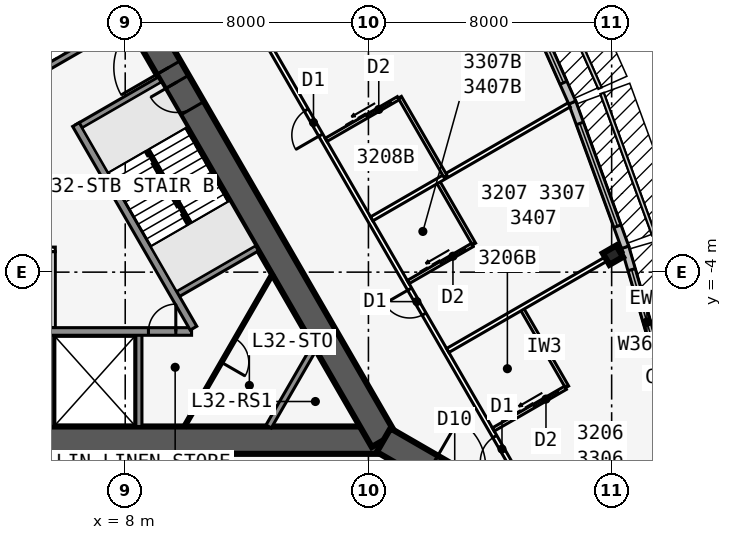
"""IFC4 building model, lengths in metres.
Left out: names, types, materials, properties, quantities, classifications, styles, units other than length and angle.
Written with IfcOpenShell. Run it as: python <this file> out.ifc"""

import sys

from ifc_helpers import new_model, si_unit, direction, frame, frame_2d, origin, origin_2d, place, context, subcontext, project, spatial, rectangle, i_section, extrude, element, fill, save


model = new_model("IFC4")
c1 = context("Model", 3, precision=1e-05, world=origin(), true_north=direction((0.0, 1.0)))
c2 = subcontext(c1, "Body", "Model", "MODEL_VIEW")
j1 = project(units=[si_unit("LENGTHUNIT", "METRE"), si_unit("PLANEANGLEUNIT", "RADIAN")], contexts=[c1])
p1 = place(None, origin())
s1 = spatial("IfcSite", under=j1, at=p1, CompositionType="ELEMENT")
p2 = place(p1, origin())
s2 = spatial("IfcBuilding", under=s1, at=p2, CompositionType="ELEMENT")
p3 = place(p2, frame((0.0, 0.0, 124.9)))
s3 = spatial("IfcBuildingStorey", under=s2, at=p3, CompositionType="ELEMENT", Elevation=124.9)
p4 = place(p3, frame((-16.5, -9.526, 0.0), z_axis=(0.0, 0.0, 1.0), x_axis=(1.0, 0.0, 0.0)))
e1 = element("IfcWall", 1, at=p4, inside=s3, PredefinedType="SHEAR", context=c2, shape_type="SweptSolid", body=[
    extrude(rectangle(XDim=33.0, YDim=0.9, at=frame_2d((16.5, 0.0))), origin(), (0.0, 0.0, 1.0), 3.4),
])
p5 = place(p4, frame((14.05, 0.0, 0.0)))
e2 = element("IfcOpeningElement", 2, at=p5, cuts=e1, PredefinedType="OPENING", context=c2, shape_type="SweptSolid", body=[
    extrude(rectangle(XDim=1.8, YDim=2.13, at=frame_2d((0.9, 1.065))), frame((0.0, 0.46, 0.0), z_axis=(0.0, -1.0, 0.0), x_axis=(1.0, 0.0, 0.0)), (0.0, 0.0, 1.0), 0.92),
])
p6 = place(p3, frame((-0.55, -5.951, 0.0), z_axis=(0.0, 0.0, 1.0), x_axis=(1.0, 0.0, 0.0)))
e3 = element("IfcWall", 3, at=p6, inside=s3, PredefinedType="SOLIDWALL", context=c2, shape_type="SweptSolid", body=[
    extrude(rectangle(XDim=10.733, YDim=0.25, at=frame_2d((5.366, 0.0))), origin(), (0.0, 0.0, 1.0), 3.235),
])
p7 = place(p6, frame((9.314, 0.0, 0.0)))
e4 = element("IfcOpeningElement", 4, at=p7, cuts=e3, PredefinedType="OPENING", context=c2, shape_type="SweptSolid", body=[
    extrude(rectangle(XDim=0.9, YDim=2.13, at=frame_2d((0.45, 1.065))), frame((0.0, 0.135, 0.0), z_axis=(0.0, -1.0, 0.0), x_axis=(1.0, 0.0, 0.0)), (0.0, 0.0, 1.0), 0.27),
])
p8 = place(p6, frame((1.05, 0.0, 0.0)))
e5 = element("IfcOpeningElement", 5, at=p8, cuts=e3, PredefinedType="OPENING", context=c2, shape_type="SweptSolid", body=[
    extrude(rectangle(XDim=1.1, YDim=2.13, at=frame_2d((0.55, 1.065))), frame((0.0, 0.135, 0.0), z_axis=(0.0, -1.0, 0.0), x_axis=(1.0, 0.0, 0.0)), (0.0, 0.0, 1.0), 0.27),
])
p9 = place(p6, frame((4.05, 0.0, 0.0)))
e6 = element("IfcOpeningElement", 6, at=p9, cuts=e3, PredefinedType="OPENING", context=c2, shape_type="SweptSolid", body=[
    extrude(rectangle(XDim=1.1, YDim=2.13, at=frame_2d((0.55, 1.065))), frame((0.0, 0.135, 0.0), z_axis=(0.0, -1.0, 0.0), x_axis=(1.0, 0.0, 0.0)), (0.0, 0.0, 1.0), 0.27),
])
for number, where, z_axis, x_axis in (
    (7, (5.55, -5.951, 0.0), (0.0, 0.0, 1.0), (0.0, -1.0, 0.0)),
    (8, (8.45, -5.951, 0.0), (0.0, 0.0, 1.0), (0.0, -1.0, 0.0)),
):
    element("IfcWall", number, at=place(p3, frame(where, z_axis=z_axis, x_axis=x_axis)), inside=s3, PredefinedType="SOLIDWALL", context=c2, shape_type="SweptSolid", body=[
        extrude(rectangle(XDim=3.125, YDim=0.2, at=frame_2d((1.562, 0.0))), origin(), (0.0, 0.0, 1.0), 3.235),
    ])
p10 = place(p3, frame((16.5, -9.526, 0.0), z_axis=(0.0, 0.0, 1.0), x_axis=(-0.499999749417, 0.866025548458, 0.0)))
e9 = element("IfcWall", 9, at=p10, inside=s3, PredefinedType="SHEAR", context=c2, shape_type="SweptSolid", body=[
    extrude(rectangle(XDim=33.0, YDim=0.9, at=frame_2d((16.5, 0.0))), origin(), (0.0, 0.0, 1.0), 3.4),
])
p11 = place(p10, frame((14.15, 0.0, 0.0)))
e10 = element("IfcOpeningElement", 10, at=p11, cuts=e9, PredefinedType="OPENING", context=c2, shape_type="SweptSolid", body=[
    extrude(rectangle(XDim=1.8, YDim=2.13, at=frame_2d((0.9, 1.065))), frame((0.0, 0.46, 0.0), z_axis=(0.0, -1.0, 0.0), x_axis=(1.0, 0.0, 0.0)), (0.0, 0.0, 1.0), 0.92),
])
p12 = place(p10, frame((12.6, 0.0, 0.0)))
e11 = element("IfcOpeningElement", 11, at=p12, cuts=e9, PredefinedType="OPENING", context=c2, shape_type="SweptSolid", body=[
    extrude(rectangle(XDim=1.0, YDim=2.13, at=frame_2d((0.5, 1.065))), frame((0.0, 0.46, 0.0), z_axis=(0.0, -1.0, 0.0), x_axis=(1.0, 0.0, 0.0)), (0.0, 0.0, 1.0), 0.92),
])
p13 = place(p3, frame((10.245, -5.843, 0.0), z_axis=(0.0, 0.0, 1.0), x_axis=(-0.499993009313, 0.866029439822, 0.0)))
e12 = element("IfcWall", 12, at=p13, inside=s3, PredefinedType="SOLIDWALL", context=c2, shape_type="SweptSolid", body=[
    extrude(rectangle(XDim=7.733, YDim=0.25, at=frame_2d((3.866, 0.0))), origin(), (0.0, 0.0, 1.0), 3.235),
])
for number, where, z_axis, x_axis in (
    (13, (9.629, -4.775, 0.0), (0.0, 0.0, 1.0), (0.866, 0.5, 0.0)),
    (14, (6.429, 0.767, 0.0), (0.0, 0.0, 1.0), (0.866, 0.5, 0.0)),
    (15, (5.329, 2.673, 0.0), (0.0, 0.0, 1.0), (0.866, 0.5, 0.0)),
):
    element("IfcWall", number, at=place(p3, frame(where, z_axis=z_axis, x_axis=x_axis)), inside=s3, PredefinedType="SOLIDWALL", context=c2, shape_type="SweptSolid", body=[
        extrude(rectangle(XDim=3.125, YDim=0.2, at=frame_2d((1.562, 0.0))), origin(), (0.0, 0.0, 1.0), 3.235),
    ])
p14 = place(p3, frame((16.5, -9.526, 0.0), z_axis=(0.0, 0.0, 1.0), x_axis=(0.866031398331, -0.499989616998, 0.0)))
e16 = element("IfcWall", 16, at=p14, inside=s3, PredefinedType="SHEAR", context=c2, shape_type="SweptSolid", body=[
    extrude(rectangle(XDim=4.746, YDim=0.9, at=frame_2d((2.373, 0.0))), origin(), (0.0, 0.0, 1.0), 3.4),
])
p15 = place(p14, frame((1.8, 0.0, 0.0)))
e17 = element("IfcOpeningElement", 17, at=p15, cuts=e16, PredefinedType="OPENING", context=c2, shape_type="SweptSolid", body=[
    extrude(rectangle(XDim=1.8, YDim=2.13, at=frame_2d((0.9, 1.065))), frame((0.0, 0.46, 0.0), z_axis=(0.0, -1.0, 0.0), x_axis=(1.0, 0.0, 0.0)), (0.0, 0.0, 1.0), 0.92),
])
p16 = place(p3, frame((24.041, -3.44, 0.0), z_axis=(0.0, 0.0, 1.0), x_axis=(-0.5, 0.866025403784, 0.0)))
e18 = element("IfcColumn", 18, at=p16, inside=s3, PredefinedType="COLUMN", context=c2, shape_type="SweptSolid", body=[
    extrude(i_section(OverallWidth=0.437, OverallDepth=0.513, WebThickness=0.061, FlangeThickness=0.097, at=origin_2d()), origin(), (0.0, 0.0, 1.0), 3.4),
])
p17 = place(p3, frame((25.88, -8.118, 0.0), z_axis=(0.0, 0.0, 1.0), x_axis=(-0.279528287117, 0.960137457191, 0.0)))
e19 = element("IfcWall", 19, at=p17, inside=s3, PredefinedType="STANDARD", context=c2, shape_type="SweptSolid", body=[
    extrude(rectangle(XDim=5.148, YDim=0.25, at=frame_2d((2.574, 0.0))), origin(), (0.0, 0.0, 1.0), 3.235),
])
p18 = place(p17, frame((0.774, 0.0, 0.45)))
e20 = element("IfcOpeningElement", 20, at=p18, cuts=e19, PredefinedType="OPENING", context=c2, shape_type="SweptSolid", body=[
    extrude(rectangle(XDim=3.6, YDim=2.4, at=frame_2d((1.8, 1.2))), frame((0.0, 0.135, 0.0), z_axis=(0.0, -1.0, 0.0), x_axis=(1.0, 0.0, 0.0)), (0.0, 0.0, 1.0), 0.27),
])
p19 = place(p3, frame((24.444, -3.183, 0.0), z_axis=(0.0, 0.0, 1.0), x_axis=(-0.343225593282, 0.939252996863, 0.0)))
e21 = element("IfcWall", 21, at=p19, inside=s3, PredefinedType="STANDARD", context=c2, shape_type="SweptSolid", body=[
    extrude(rectangle(XDim=5.076, YDim=0.25, at=frame_2d((2.538, 0.0))), origin(), (0.0, 0.0, 1.0), 3.235),
])
p20 = place(p19, frame((0.738, 0.0, 0.45)))
e22 = element("IfcOpeningElement", 22, at=p20, cuts=e21, PredefinedType="OPENING", context=c2, shape_type="SweptSolid", body=[
    extrude(rectangle(XDim=3.6, YDim=2.4, at=frame_2d((1.8, 1.2))), frame((0.0, 0.135, 0.0), z_axis=(0.0, -1.0, 0.0), x_axis=(1.0, 0.0, 0.0)), (0.0, 0.0, 1.0), 0.27),
])
p21 = place(p3, frame((22.705, 1.576, 0.0), z_axis=(0.0, 0.0, 1.0), x_axis=(-0.406832200364, 0.913502906808, 0.0)))
e23 = element("IfcWall", 23, at=p21, inside=s3, PredefinedType="STANDARD", context=c2, shape_type="SweptSolid", body=[
    extrude(rectangle(XDim=5.028, YDim=0.25, at=frame_2d((2.514, 0.0))), origin(), (0.0, 0.0, 1.0), 3.235),
])
p22 = place(p21, frame((0.714, 0.0, 0.45)))
e24 = element("IfcOpeningElement", 24, at=p22, cuts=e23, PredefinedType="OPENING", context=c2, shape_type="SweptSolid", body=[
    extrude(rectangle(XDim=3.6, YDim=2.4, at=frame_2d((1.8, 1.2))), frame((0.0, 0.135, 0.0), z_axis=(0.0, -1.0, 0.0), x_axis=(1.0, 0.0, 0.0)), (0.0, 0.0, 1.0), 0.27),
])
p23 = place(p3, frame((21.586, -11.885, 0.0), z_axis=(0.0, 0.0, 1.0), x_axis=(-0.500001915564, 0.86602429783, 0.0)))
e25 = element("IfcWall", 25, at=p23, inside=s3, PredefinedType="PARTITIONING", context=c2, shape_type="SweptSolid", body=[
    extrude(rectangle(XDim=42.172, YDim=0.15, at=frame_2d((21.086, 0.0))), origin(), (0.0, 0.0, 1.0), 3.235),
])
p24 = place(p23, frame((1.911, 0.0, 0.0)))
e26 = element("IfcOpeningElement", 26, at=p24, cuts=e25, PredefinedType="OPENING", context=c2, shape_type="SweptSolid", body=[
    extrude(rectangle(XDim=0.95, YDim=2.13, at=frame_2d((0.475, 1.065))), frame((0.0, 0.085, 0.0), z_axis=(0.0, -1.0, 0.0), x_axis=(1.0, 0.0, 0.0)), (0.0, 0.0, 1.0), 0.17),
])
p25 = place(p23, frame((7.511, 0.0, 0.0)))
e27 = element("IfcOpeningElement", 27, at=p25, cuts=e25, PredefinedType="OPENING", context=c2, shape_type="SweptSolid", body=[
    extrude(rectangle(XDim=0.95, YDim=2.13, at=frame_2d((0.475, 1.065))), frame((0.0, 0.085, 0.0), z_axis=(0.0, -1.0, 0.0), x_axis=(1.0, 0.0, 0.0)), (0.0, 0.0, 1.0), 0.17),
])
p26 = place(p23, frame((14.311, 0.0, 0.0)))
e28 = element("IfcOpeningElement", 28, at=p26, cuts=e25, PredefinedType="OPENING", context=c2, shape_type="SweptSolid", body=[
    extrude(rectangle(XDim=0.95, YDim=2.13, at=frame_2d((0.475, 1.065))), frame((0.0, 0.085, 0.0), z_axis=(0.0, -1.0, 0.0), x_axis=(1.0, 0.0, 0.0)), (0.0, 0.0, 1.0), 0.17),
])
p27 = place(p23, frame((22.511, 0.0, 0.0)))
e29 = element("IfcOpeningElement", 29, at=p27, cuts=e25, PredefinedType="OPENING", context=c2, shape_type="SweptSolid", body=[
    extrude(rectangle(XDim=0.95, YDim=2.13, at=frame_2d((0.475, 1.065))), frame((0.0, 0.085, 0.0), z_axis=(0.0, -1.0, 0.0), x_axis=(1.0, 0.0, 0.0)), (0.0, 0.0, 1.0), 0.17),
])
p28 = place(p23, frame((29.311, 0.0, 0.0)))
e30 = element("IfcOpeningElement", 30, at=p28, cuts=e25, PredefinedType="OPENING", context=c2, shape_type="SweptSolid", body=[
    extrude(rectangle(XDim=0.95, YDim=2.13, at=frame_2d((0.475, 1.065))), frame((0.0, 0.085, 0.0), z_axis=(0.0, -1.0, 0.0), x_axis=(1.0, 0.0, 0.0)), (0.0, 0.0, 1.0), 0.17),
])
p29 = place(p23, frame((39.311, 0.0, 0.0)))
e31 = element("IfcOpeningElement", 31, at=p29, cuts=e25, PredefinedType="OPENING", context=c2, shape_type="SweptSolid", body=[
    extrude(rectangle(XDim=0.95, YDim=2.13, at=frame_2d((0.475, 1.065))), frame((0.0, 0.085, 0.0), z_axis=(0.0, -1.0, 0.0), x_axis=(1.0, 0.0, 0.0)), (0.0, 0.0, 1.0), 0.17),
])
p30 = place(p3, frame((18.608, -6.577, 0.0), z_axis=(0.0, 0.0, 1.0), x_axis=(0.866031967744, 0.499988630717, 0.0)))
e32 = element("IfcWall", 32, at=p30, inside=s3, PredefinedType="PARTITIONING", context=c2, shape_type="SweptSolid", body=[
    extrude(rectangle(XDim=6.616, YDim=0.15, at=frame_2d((3.308, 0.0))), origin(), (0.0, 0.0, 1.0), 2.389),
])
p31 = place(p3, frame((16.108, -2.247, 0.0), z_axis=(0.0, 0.0, 1.0), x_axis=(0.866025567496, 0.499999716443, 0.0)))
e33 = element("IfcWall", 33, at=p31, inside=s3, PredefinedType="PARTITIONING", context=c2, shape_type="SweptSolid", body=[
    extrude(rectangle(XDim=7.495, YDim=0.15, at=frame_2d((3.748, 0.0))), origin(), (0.0, 0.0, 1.0), 2.389),
])
p32 = place(p3, frame((22.533, -7.775, 0.0), z_axis=(0.0, 0.0, 1.0), x_axis=(-0.499990139034, 0.866031096941, 0.0)))
e34 = element("IfcWall", 34, at=p32, inside=s3, PredefinedType="PLUMBINGWALL", context=c2, shape_type="SweptSolid", body=[
    extrude(rectangle(XDim=3.0, YDim=0.12, at=frame_2d((1.5, 0.0))), origin(), (0.0, 0.0, 1.0), 3.235),
])
p33 = place(p3, frame((20.108, -9.175, 0.0), z_axis=(0.0, 0.0, 1.0), x_axis=(0.866035715982, 0.499982138324, 0.0)))
e35 = element("IfcWall", 35, at=p33, inside=s3, PredefinedType="PLUMBINGWALL", context=c2, shape_type="SweptSolid", body=[
    extrude(rectangle(XDim=2.74, YDim=0.12, at=frame_2d((1.37, 0.0))), origin(), (0.0, 0.0, 1.0), 3.235),
])
p34 = place(p33, frame((1.55, 0.0, 0.0)))
e36 = element("IfcOpeningElement", 36, at=p34, cuts=e35, PredefinedType="OPENING", context=c2, shape_type="SweptSolid", body=[
    extrude(rectangle(XDim=0.9, YDim=2.13, at=frame_2d((0.45, 1.065))), frame((0.0, 0.07, 0.0), z_axis=(0.0, -1.0, 0.0), x_axis=(1.0, 0.0, 0.0)), (0.0, 0.0, 1.0), 0.14),
])
p35 = place(p3, frame((19.473, -3.076, 0.0), z_axis=(0.0, 0.0, 1.0), x_axis=(-0.499957262057, 0.866050077142, 0.0)))
e37 = element("IfcWall", 37, at=p35, inside=s3, PredefinedType="PLUMBINGWALL", context=c2, shape_type="SweptSolid", body=[
    extrude(rectangle(XDim=2.4, YDim=0.12, at=frame_2d((1.2, 0.0))), origin(), (0.0, 0.0, 1.0), 3.235),
])
p36 = place(p3, frame((17.308, -4.326, 0.0), z_axis=(0.0, 0.0, 1.0), x_axis=(0.866023955769, 0.500002508028, 0.0)))
e38 = element("IfcWall", 38, at=p36, inside=s3, PredefinedType="PLUMBINGWALL", context=c2, shape_type="SweptSolid", body=[
    extrude(rectangle(XDim=2.44, YDim=0.12, at=frame_2d((1.22, 0.0))), origin(), (0.0, 0.0, 1.0), 3.235),
])
p37 = place(p36, frame((1.25, 0.0, 0.0)))
e39 = element("IfcOpeningElement", 39, at=p37, cuts=e38, PredefinedType="OPENING", context=c2, shape_type="SweptSolid", body=[
    extrude(rectangle(XDim=0.9, YDim=2.13, at=frame_2d((0.45, 1.065))), frame((0.0, 0.07, 0.0), z_axis=(0.0, -1.0, 0.0), x_axis=(1.0, 0.0, 0.0)), (0.0, 0.0, 1.0), 0.14),
])
p38 = place(p3, frame((18.533, -0.847, 0.0), z_axis=(0.0, 0.0, 1.0), x_axis=(-0.499990139034, 0.866031096941, 0.0)))
e40 = element("IfcWall", 40, at=p38, inside=s3, PredefinedType="PLUMBINGWALL", context=c2, shape_type="SweptSolid", body=[
    extrude(rectangle(XDim=3.0, YDim=0.12, at=frame_2d((1.5, 0.0))), origin(), (0.0, 0.0, 1.0), 3.235),
])
p39 = place(p3, frame((14.608, 0.351, 0.0), z_axis=(0.0, 0.0, 1.0), x_axis=(0.866035715982, 0.499982138324, 0.0)))
e41 = element("IfcWall", 41, at=p39, inside=s3, PredefinedType="PLUMBINGWALL", context=c2, shape_type="SweptSolid", body=[
    extrude(rectangle(XDim=2.74, YDim=0.12, at=frame_2d((1.37, 0.0))), origin(), (0.0, 0.0, 1.0), 3.235),
])
p40 = place(p39, frame((1.55, 0.0, 0.0)))
e42 = element("IfcOpeningElement", 42, at=p40, cuts=e41, PredefinedType="OPENING", context=c2, shape_type="SweptSolid", body=[
    extrude(rectangle(XDim=0.9, YDim=2.13, at=frame_2d((0.45, 1.065))), frame((0.0, 0.07, 0.0), z_axis=(0.0, -1.0, 0.0), x_axis=(1.0, 0.0, 0.0)), (0.0, 0.0, 1.0), 0.14),
])
p41 = place(p3, frame((-2.65, -3.251, 0.0), z_axis=(0.0, 0.0, 1.0), x_axis=(1.0, 0.0, 0.0)))
e43 = element("IfcWall", 43, at=p41, inside=s3, PredefinedType="PARTITIONING", context=c2, shape_type="SweptSolid", body=[
    extrude(rectangle(XDim=8.35, YDim=0.15, at=frame_2d((4.175, 0.0))), origin(), (0.0, 0.0, 1.0), 3.235),
])
p42 = place(p3, frame((5.625, -5.826, 0.0), z_axis=(0.0, 0.0, 1.0), x_axis=(0.0, 1.0, 0.0)))
e44 = element("IfcWall", 44, at=p42, inside=s3, PredefinedType="PARTITIONING", context=c2, shape_type="SweptSolid", body=[
    extrude(rectangle(XDim=2.5, YDim=0.15, at=frame_2d((1.25, 0.0))), origin(), (0.0, 0.0, 1.0), 3.235),
])
p43 = place(p3, frame((14.219, -6.476, 0.0), z_axis=(0.0, 0.0, 1.0), x_axis=(-0.499952404951, -0.866052881055, 0.0)))
e45 = element("IfcWall", 45, at=p43, inside=s3, PredefinedType="SOLIDWALL", context=c2, shape_type="SweptSolid", body=[
    extrude(rectangle(XDim=3.002, YDim=0.2, at=frame_2d((1.501, 0.0))), origin(), (0.0, 0.0, 1.0), 3.235),
])
p44 = place(p3, frame((12.834, -4.076, 0.0), z_axis=(0.0, 0.0, 1.0), x_axis=(-0.500027479704, -0.866009537788, 0.0)))
e46 = element("IfcWall", 46, at=p44, inside=s3, PredefinedType="PARTITIONING", context=c2, shape_type="SweptSolid", body=[
    extrude(rectangle(XDim=5.774, YDim=0.1, at=frame_2d((2.887, 0.0))), origin(), (0.0, 0.0, 1.0), 3.235),
])
p45 = place(p44, frame((2.437, 0.0, 0.0)))
e47 = element("IfcOpeningElement", 47, at=p45, cuts=e46, PredefinedType="OPENING", context=c2, shape_type="SweptSolid", body=[
    extrude(rectangle(XDim=0.9, YDim=2.13, at=frame_2d((0.45, 1.065))), frame((0.0, 0.06, 0.0), z_axis=(0.0, -1.0, 0.0), x_axis=(1.0, 0.0, 0.0)), (0.0, 0.0, 1.0), 0.12),
])
p46 = place(p3, frame((10.135, -2.401, 0.0), z_axis=(0.0, 0.0, 1.0), x_axis=(-0.499992232847, 0.866029888106, 0.0)))
e48 = element("IfcWall", 48, at=p46, inside=s3, PredefinedType="SOLIDWALL", context=c2, shape_type="SweptSolid", body=[
    extrude(rectangle(XDim=2.794, YDim=0.1, at=frame_2d((1.397, 0.0))), origin(), (0.0, 0.0, 1.0), 3.4),
])
p47 = place(p18, origin())
e49 = element("IfcWindow", 49, at=p47, inside=s3, PartitioningType="SINGLE_PANEL", PredefinedType="WINDOW", context=c2, shape_type="SweptSolid", body=[
    extrude(rectangle(XDim=3.6, YDim=2.4, at=frame_2d((1.8, 1.2))), frame((0.0, 0.03, 0.0), z_axis=(0.0, -1.0, 0.0), x_axis=(1.0, 0.0, 0.0)), (0.0, 0.0, 1.0), 0.06),
])
fill(e20, e49)
p48 = place(p20, origin())
e50 = element("IfcWindow", 50, at=p48, inside=s3, PartitioningType="SINGLE_PANEL", PredefinedType="WINDOW", context=c2, shape_type="SweptSolid", body=[
    extrude(rectangle(XDim=3.6, YDim=2.4, at=frame_2d((1.8, 1.2))), frame((0.0, 0.03, 0.0), z_axis=(0.0, -1.0, 0.0), x_axis=(1.0, 0.0, 0.0)), (0.0, 0.0, 1.0), 0.06),
])
fill(e22, e50)
p49 = place(p22, origin())
e51 = element("IfcWindow", 51, at=p49, inside=s3, PartitioningType="SINGLE_PANEL", PredefinedType="WINDOW", context=c2, shape_type="SweptSolid", body=[
    extrude(rectangle(XDim=3.6, YDim=2.4, at=frame_2d((1.8, 1.2))), frame((0.0, 0.03, 0.0), z_axis=(0.0, -1.0, 0.0), x_axis=(1.0, 0.0, 0.0)), (0.0, 0.0, 1.0), 0.06),
])
fill(e24, e51)
p50 = place(p34, origin())
e52 = element("IfcDoor", 52, at=p50, inside=s3, OperationType="SLIDING_TO_LEFT", PredefinedType="DOOR", context=c2, shape_type="SweptSolid", body=[
    extrude(rectangle(XDim=0.9, YDim=2.13, at=frame_2d((0.45, 1.065))), frame((0.0, 0.025, 0.0), z_axis=(0.0, -1.0, 0.0), x_axis=(1.0, 0.0, 0.0)), (0.0, 0.0, 1.0), 0.05),
])
fill(e36, e52)
p51 = place(p24, origin())
e53 = element("IfcDoor", 53, at=p51, inside=s3, OperationType="SINGLE_SWING_LEFT", PredefinedType="DOOR", context=c2, shape_type="SweptSolid", body=[
    extrude(rectangle(XDim=0.95, YDim=2.13, at=frame_2d((0.475, 1.065))), frame((0.0, 0.025, 0.0), z_axis=(0.0, -1.0, 0.0), x_axis=(1.0, 0.0, 0.0)), (0.0, 0.0, 1.0), 0.05),
])
fill(e26, e53)
p52 = place(p37, origin())
e54 = element("IfcDoor", 54, at=p52, inside=s3, OperationType="SLIDING_TO_LEFT", PredefinedType="DOOR", context=c2, shape_type="SweptSolid", body=[
    extrude(rectangle(XDim=0.9, YDim=2.13, at=frame_2d((0.45, 1.065))), frame((0.0, 0.025, 0.0), z_axis=(0.0, -1.0, 0.0), x_axis=(1.0, 0.0, 0.0)), (0.0, 0.0, 1.0), 0.05),
])
fill(e39, e54)
p53 = place(p25, origin())
e55 = element("IfcDoor", 55, at=p53, inside=s3, OperationType="SINGLE_SWING_RIGHT", PredefinedType="DOOR", context=c2, shape_type="SweptSolid", body=[
    extrude(rectangle(XDim=0.95, YDim=2.13, at=frame_2d((0.475, 1.065))), frame((0.0, 0.025, 0.0), z_axis=(0.0, -1.0, 0.0), x_axis=(1.0, 0.0, 0.0)), (0.0, 0.0, 1.0), 0.05),
])
fill(e27, e55)
p54 = place(p40, origin())
e56 = element("IfcDoor", 56, at=p54, inside=s3, OperationType="SLIDING_TO_LEFT", PredefinedType="DOOR", context=c2, shape_type="SweptSolid", body=[
    extrude(rectangle(XDim=0.9, YDim=2.13, at=frame_2d((0.45, 1.065))), frame((0.0, 0.025, 0.0), z_axis=(0.0, -1.0, 0.0), x_axis=(1.0, 0.0, 0.0)), (0.0, 0.0, 1.0), 0.05),
])
fill(e42, e56)
p55 = place(p26, origin())
e57 = element("IfcDoor", 57, at=p55, inside=s3, OperationType="SINGLE_SWING_LEFT", PredefinedType="DOOR", context=c2, shape_type="SweptSolid", body=[
    extrude(rectangle(XDim=0.95, YDim=2.13, at=frame_2d((0.475, 1.065))), frame((0.0, 0.025, 0.0), z_axis=(0.0, -1.0, 0.0), x_axis=(1.0, 0.0, 0.0)), (0.0, 0.0, 1.0), 0.05),
])
fill(e28, e57)
p56 = place(p11, origin())
e58 = element("IfcDoor", 58, at=p56, inside=s3, OperationType="DOUBLE_DOOR_SINGLE_SWING", PredefinedType="DOOR", context=c2, shape_type="SweptSolid", body=[
    extrude(rectangle(XDim=1.8, YDim=2.13, at=frame_2d((0.9, 1.065))), frame((0.0, 0.025, 0.0), z_axis=(0.0, -1.0, 0.0), x_axis=(1.0, 0.0, 0.0)), (0.0, 0.0, 1.0), 0.05),
])
fill(e10, e58)
p57 = place(p12, origin())
e59 = element("IfcDoor", 59, at=p57, inside=s3, OperationType="SINGLE_SWING_RIGHT", PredefinedType="DOOR", context=c2, shape_type="SweptSolid", body=[
    extrude(rectangle(XDim=1.0, YDim=2.13, at=frame_2d((0.5, 1.065))), frame((0.0, 0.025, 0.0), z_axis=(0.0, -1.0, 0.0), x_axis=(1.0, 0.0, 0.0)), (0.0, 0.0, 1.0), 0.05),
])
fill(e11, e59)
p58 = place(p45, origin())
e60 = element("IfcDoor", 60, at=p58, inside=s3, OperationType="SINGLE_SWING_RIGHT", PredefinedType="DOOR", context=c2, shape_type="SweptSolid", body=[
    extrude(rectangle(XDim=0.9, YDim=2.13, at=frame_2d((0.45, 1.065))), frame((0.0, 0.025, 0.0), z_axis=(0.0, -1.0, 0.0), x_axis=(1.0, 0.0, 0.0)), (0.0, 0.0, 1.0), 0.05),
])
fill(e47, e60)
p59 = place(p7, origin())
e61 = element("IfcDoor", 61, at=p59, inside=s3, OperationType="SINGLE_SWING_RIGHT", PredefinedType="DOOR", context=c2, shape_type="SweptSolid", body=[
    extrude(rectangle(XDim=0.9, YDim=2.13, at=frame_2d((0.45, 1.065))), frame((0.0, 0.025, 0.0), z_axis=(0.0, -1.0, 0.0), x_axis=(1.0, 0.0, 0.0)), (0.0, 0.0, 1.0), 0.05),
])
fill(e4, e61)
save(model, sys.argv[1])
